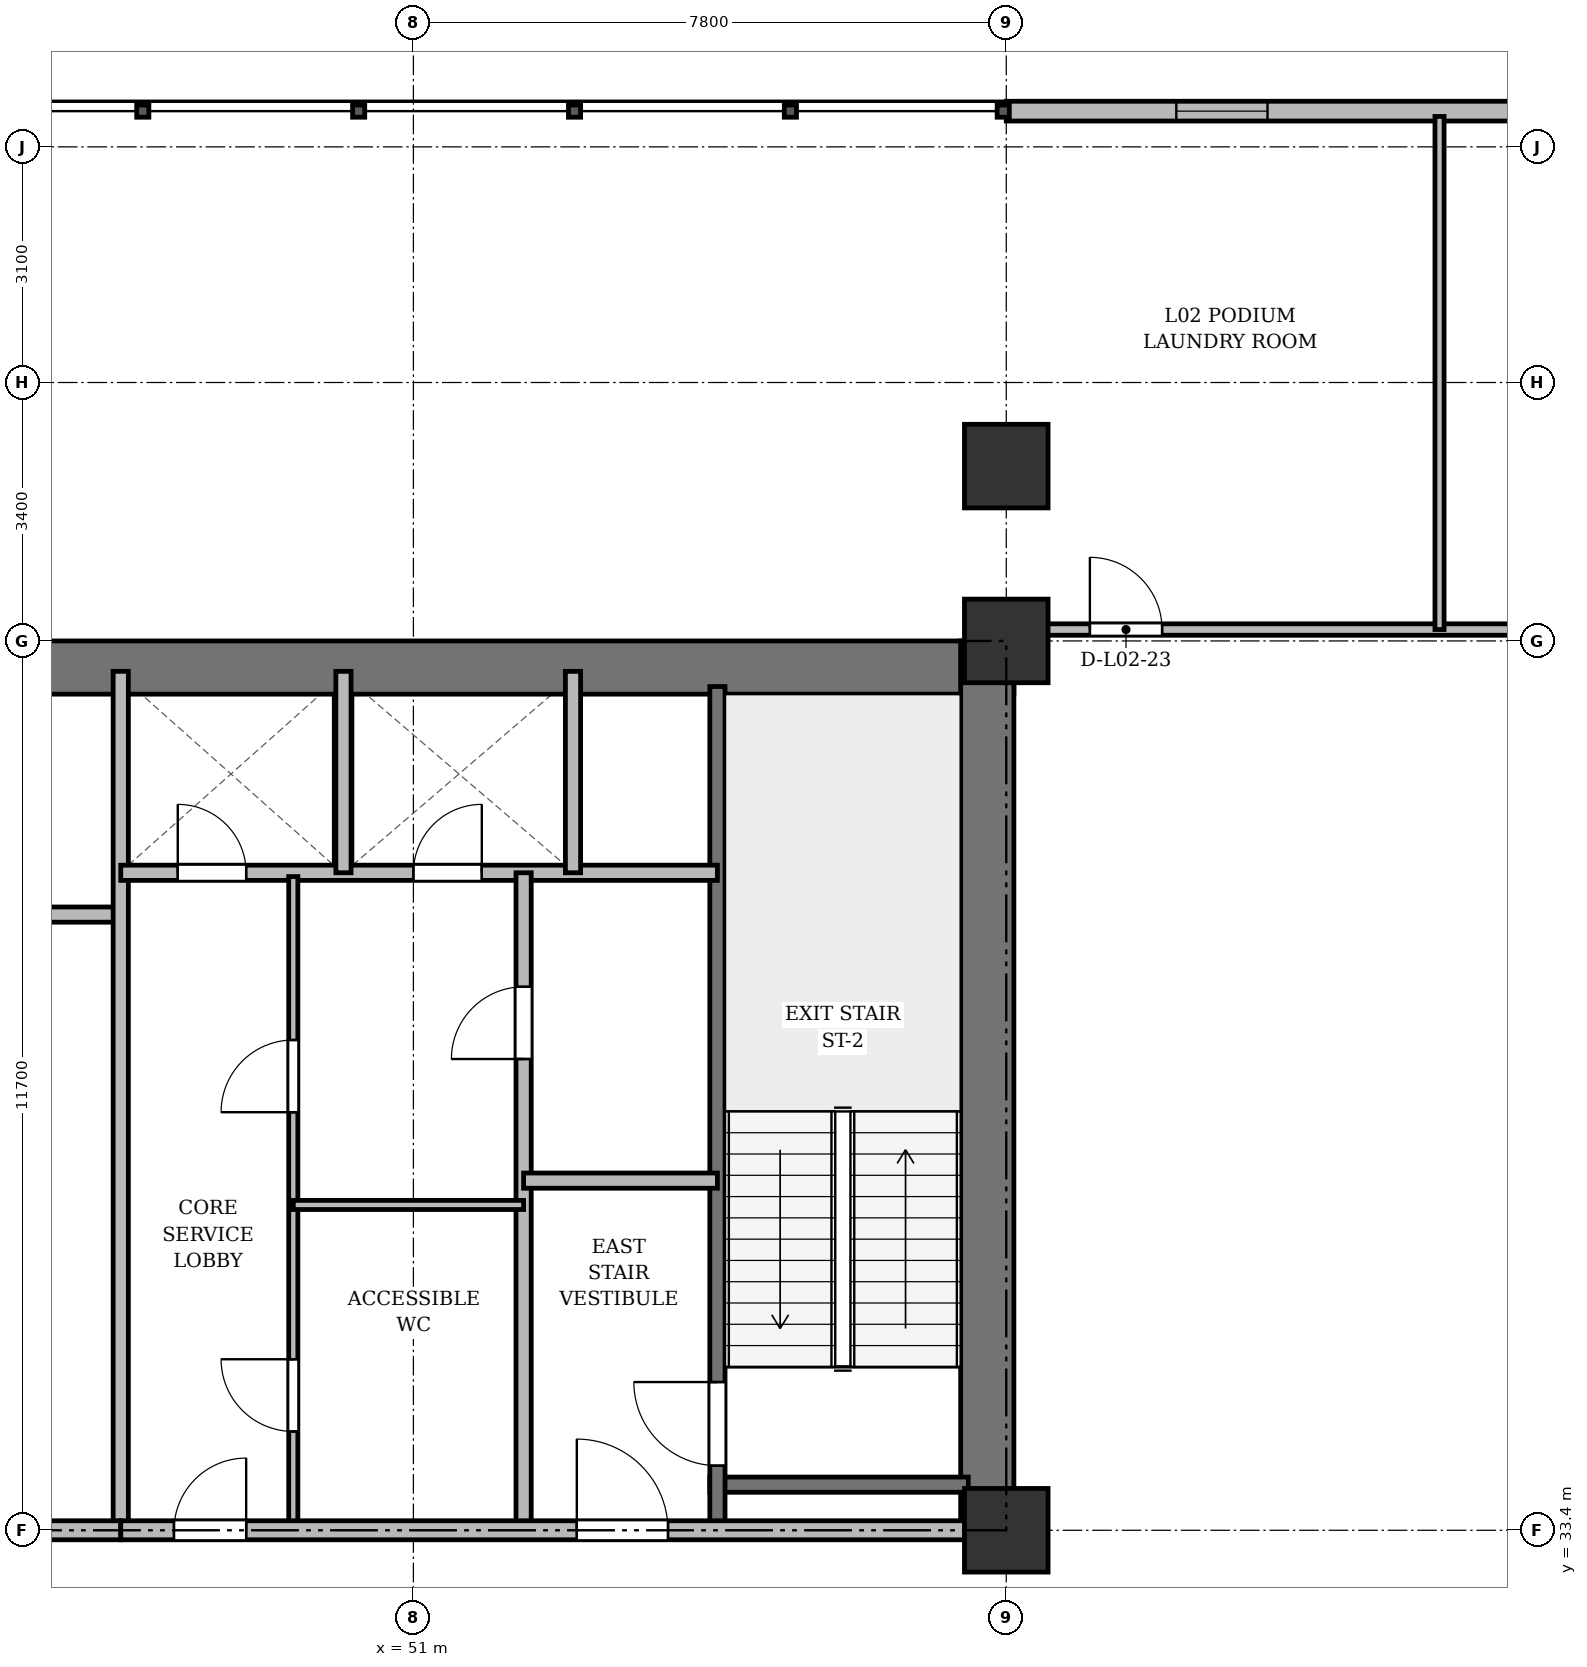
"""IFC4 building model, lengths in metres.
Left out: names, types, materials, properties, quantities, classifications, styles, units other than length and angle.
Written with IfcOpenShell. Run it as: python <this file> out.ifc"""

import sys

from ifc_helpers import new_model, si_unit, direction, frame, frame_2d, origin, origin_2d, place, context, subcontext, project, spatial, rectangle, extrude, source, transform, mapped, element, fill, save


model = new_model("IFC4")
c1 = context("Model", 3, precision=1e-05, world=origin(), true_north=direction((0.0, 1.0)))
c2 = subcontext(c1, "Body", "Model", "MODEL_VIEW")
j1 = project(units=[si_unit("LENGTHUNIT", "METRE"), si_unit("PLANEANGLEUNIT", "RADIAN")], contexts=[c1])
p1 = place(None, origin())
s1 = spatial("IfcSite", under=j1, at=p1, CompositionType="ELEMENT")
p2 = place(p1, origin())
s2 = spatial("IfcBuilding", under=s1, at=p2, CompositionType="ELEMENT")
p3 = place(p2, frame((0.0, 0.0, 9.7)))
s3 = spatial("IfcBuildingStorey", under=s2, at=p3, CompositionType="ELEMENT", Elevation=9.7)
m1 = source(origin(), c2, "Body", "SweptSolid", [
    extrude(rectangle(XDim=1.1, YDim=1.1, at=origin_2d()), origin(), (0.0, 0.0, 1.0), 4.5),
])
for number, where, z_axis, x_axis in (
    (1, (58.8, 33.4, 0.0), (0.0, 0.0, 1.0), (1.0, 0.0, 0.0)),
    (2, (58.8, 45.1, 0.0), (0.0, 0.0, 1.0), (1.0, 0.0, 0.0)),
    (3, (58.8, 47.4, 0.0), (0.0, 0.0, 1.0), (1.0, 0.0, 0.0)),
):
    element("IfcColumn", number, at=place(p3, frame(where, z_axis=z_axis, x_axis=x_axis)), inside=s3, PredefinedType="COLUMN", context=c2, shape_type="MappedRepresentation", body=[
        mapped(m1, transform((0.0, 0.0, 0.0), x_axis=(1.0, 0.0, 0.0), y_axis=(0.0, 1.0, 0.0), z_axis=(0.0, 0.0, 1.0), scale=1.0)),
    ])
p4 = place(p3, frame((58.8, 52.07, 0.0), z_axis=(0.0, 0.0, 1.0), x_axis=(1.0, 0.0, 0.0)))
e4 = element("IfcWall", 4, at=p4, inside=s3, PredefinedType="SOLIDWALL", context=c2, shape_type="SweptSolid", body=[
    extrude(rectangle(XDim=17.45, YDim=0.26, at=frame_2d((8.725, 0.0))), origin(), (0.0, 0.0, 1.0), 4.2),
])
p5 = place(p4, frame((2.237, 0.0, 0.9)))
e5 = element("IfcOpeningElement", 5, at=p5, cuts=e4, PredefinedType="OPENING", context=c2, shape_type="SweptSolid", body=[
    extrude(rectangle(XDim=1.2, YDim=1.65, at=frame_2d((0.6, 0.825))), frame((0.0, 0.14, 0.0), z_axis=(0.0, -1.0, 0.0), x_axis=(1.0, 0.0, 0.0)), (0.0, 0.0, 1.0), 0.28),
])
p6 = place(p4, frame((10.985, 0.0, 0.9)))
e6 = element("IfcOpeningElement", 6, at=p6, cuts=e4, PredefinedType="OPENING", context=c2, shape_type="SweptSolid", body=[
    extrude(rectangle(XDim=1.2, YDim=1.65, at=frame_2d((0.6, 0.825))), frame((0.0, 0.14, 0.0), z_axis=(0.0, -1.0, 0.0), x_axis=(1.0, 0.0, 0.0)), (0.0, 0.0, 1.0), 0.28),
])
p7 = place(p3, frame((15.5, 44.75, 0.0), z_axis=(0.0, 0.0, 1.0), x_axis=(1.0, 0.0, 0.0)))
e7 = element("IfcWall", 7, at=p7, inside=s3, PredefinedType="SHEAR", context=c2, shape_type="SweptSolid", body=[
    extrude(rectangle(XDim=43.4, YDim=0.7, at=frame_2d((21.7, 0.0))), origin(), (0.0, 0.0, 1.0), 4.2),
])
p8 = place(p3, frame((58.55, 33.4, 0.0), z_axis=(0.0, 0.0, 1.0), x_axis=(0.0, 1.0, 0.0)))
e8 = element("IfcWall", 8, at=p8, inside=s3, PredefinedType="SHEAR", context=c2, shape_type="SweptSolid", body=[
    extrude(rectangle(XDim=11.7, YDim=0.7, at=frame_2d((5.85, 0.0))), origin(), (0.0, 0.0, 1.0), 4.2),
])
p9 = place(p3, frame((54.9, 34.0, 0.0), z_axis=(0.0, 0.0, 1.0), x_axis=(1.0, 0.0, 0.0)))
e9 = element("IfcWall", 9, at=p9, inside=s3, PredefinedType="SHEAR", context=c2, shape_type="SweptSolid", body=[
    extrude(rectangle(XDim=3.4, YDim=0.2, at=frame_2d((1.7, 0.0))), origin(), (0.0, 0.0, 1.0), 4.2),
])
p10 = place(p3, frame((55.0, 33.4, 0.0), z_axis=(0.0, 0.0, 1.0), x_axis=(0.0, 1.0, 0.0)))
e10 = element("IfcWall", 10, at=p10, inside=s3, PredefinedType="SHEAR", context=c2, shape_type="SweptSolid", body=[
    extrude(rectangle(XDim=11.1, YDim=0.2, at=frame_2d((5.55, 0.0))), origin(), (0.0, 0.0, 1.0), 4.2),
])
p11 = place(p10, frame((0.85, 0.0, 0.0)))
e11 = element("IfcOpeningElement", 11, at=p11, cuts=e10, PredefinedType="OPENING", context=c2, shape_type="SweptSolid", body=[
    extrude(rectangle(XDim=1.1, YDim=2.15, at=frame_2d((0.55, 1.075))), frame((0.0, 0.11, 0.0), z_axis=(0.0, -1.0, 0.0), x_axis=(1.0, 0.0, 0.0)), (0.0, 0.0, 1.0), 0.22),
])
p12 = place(p3, frame((40.25, 41.5, 0.0), z_axis=(0.0, 0.0, 1.0), x_axis=(1.0, 0.0, 0.0)))
e12 = element("IfcWall", 12, at=p12, inside=s3, PredefinedType="SOLIDWALL", context=c2, shape_type="SweptSolid", body=[
    extrude(rectangle(XDim=6.9, YDim=0.2, at=frame_2d((3.45, 0.0))), origin(), (0.0, 0.0, 1.0), 3.4),
])
p13 = place(p3, frame((47.15, 33.4, 0.0), z_axis=(0.0, 0.0, 1.0), x_axis=(0.0, 1.0, 0.0)))
e13 = element("IfcWall", 13, at=p13, inside=s3, PredefinedType="SOLIDWALL", context=c2, shape_type="SweptSolid", body=[
    extrude(rectangle(XDim=11.3, YDim=0.2, at=frame_2d((5.65, 0.0))), origin(), (0.0, 0.0, 1.0), 3.1),
])
p14 = place(p3, frame((26.3, 33.4, 0.0), z_axis=(0.0, 0.0, 1.0), x_axis=(1.0, 0.0, 0.0)))
e14 = element("IfcWall", 14, at=p14, inside=s3, PredefinedType="PARTITIONING", context=c2, shape_type="SweptSolid", body=[
    extrude(rectangle(XDim=20.85, YDim=0.25, at=frame_2d((10.425, 0.0))), origin(), (0.0, 0.0, 1.0), 3.1),
])
p15 = place(p14, frame((9.2, 0.0, 0.0)))
e15 = element("IfcOpeningElement", 15, at=p15, cuts=e14, PredefinedType="OPENING", context=c2, shape_type="SweptSolid", body=[
    extrude(rectangle(XDim=1.6, YDim=2.2, at=frame_2d((0.8, 1.1))), frame((0.0, 0.135, 0.0), z_axis=(0.0, -1.0, 0.0), x_axis=(1.0, 0.0, 0.0)), (0.0, 0.0, 1.0), 0.27),
])
p16 = place(p3, frame((47.15, 42.05, 0.0), z_axis=(0.0, 0.0, 1.0), x_axis=(1.0, 0.0, 0.0)))
e16 = element("IfcWall", 16, at=p16, inside=s3, PredefinedType="SOLIDWALL", context=c2, shape_type="SweptSolid", body=[
    extrude(rectangle(XDim=7.85, YDim=0.2, at=frame_2d((3.925, 0.0))), origin(), (0.0, 0.0, 1.0), 4.2),
])
p17 = place(p16, frame((0.75, 0.0, 0.0)))
e17 = element("IfcOpeningElement", 17, at=p17, cuts=e16, PredefinedType="OPENING", context=c2, shape_type="SweptSolid", body=[
    extrude(rectangle(XDim=0.9, YDim=2.1, at=frame_2d((0.45, 1.05))), frame((0.0, 0.11, 0.0), z_axis=(0.0, -1.0, 0.0), x_axis=(1.0, 0.0, 0.0)), (0.0, 0.0, 1.0), 0.22),
])
p18 = place(p16, frame((3.85, 0.0, 0.0)))
e18 = element("IfcOpeningElement", 18, at=p18, cuts=e16, PredefinedType="OPENING", context=c2, shape_type="SweptSolid", body=[
    extrude(rectangle(XDim=0.9, YDim=2.1, at=frame_2d((0.45, 1.05))), frame((0.0, 0.11, 0.0), z_axis=(0.0, -1.0, 0.0), x_axis=(1.0, 0.0, 0.0)), (0.0, 0.0, 1.0), 0.22),
])
for number, where, z_axis, x_axis in (
    (19, (50.08, 42.05, 0.0), (0.0, 0.0, 1.0), (0.0, 1.0, 0.0)),
    (20, (53.1, 42.05, 0.0), (0.0, 0.0, 1.0), (0.0, 1.0, 0.0)),
):
    element("IfcWall", number, at=place(p3, frame(where, z_axis=z_axis, x_axis=x_axis)), inside=s3, PredefinedType="SOLIDWALL", context=c2, shape_type="SweptSolid", body=[
        extrude(rectangle(XDim=2.65, YDim=0.2, at=frame_2d((1.325, 0.0))), origin(), (0.0, 0.0, 1.0), 4.2),
    ])
p19 = place(p3, frame((52.45, 33.4, 0.0), z_axis=(0.0, 0.0, 1.0), x_axis=(0.0, 1.0, 0.0)))
e21 = element("IfcWall", 21, at=p19, inside=s3, PredefinedType="PARTITIONING", context=c2, shape_type="SweptSolid", body=[
    extrude(rectangle(XDim=8.65, YDim=0.2, at=frame_2d((4.325, 0.0))), origin(), (0.0, 0.0, 1.0), 3.1),
])
p20 = place(p19, frame((6.2, 0.0, 0.0)))
e22 = element("IfcOpeningElement", 22, at=p20, cuts=e21, PredefinedType="OPENING", context=c2, shape_type="SweptSolid", body=[
    extrude(rectangle(XDim=0.95, YDim=2.15, at=frame_2d((0.475, 1.075))), frame((0.0, 0.11, 0.0), z_axis=(0.0, -1.0, 0.0), x_axis=(1.0, 0.0, 0.0)), (0.0, 0.0, 1.0), 0.22),
])
p21 = place(p3, frame((52.45, 38.0, 0.0), z_axis=(0.0, 0.0, 1.0), x_axis=(1.0, 0.0, 0.0)))
e23 = element("IfcWall", 23, at=p21, inside=s3, PredefinedType="PARTITIONING", context=c2, shape_type="SweptSolid", body=[
    extrude(rectangle(XDim=2.55, YDim=0.2, at=frame_2d((1.275, 0.0))), origin(), (0.0, 0.0, 1.0), 4.2),
])
p22 = place(p3, frame((49.42, 33.4, 0.0), z_axis=(0.0, 0.0, 1.0), x_axis=(0.0, 1.0, 0.0)))
e24 = element("IfcWall", 24, at=p22, inside=s3, PredefinedType="PARTITIONING", context=c2, shape_type="SweptSolid", body=[
    extrude(rectangle(XDim=8.6, YDim=0.12, at=frame_2d((4.3, 0.0))), origin(), (0.0, 0.0, 1.0), 3.1),
])
p23 = place(p22, frame((1.3, 0.0, 0.0)))
e25 = element("IfcOpeningElement", 25, at=p23, cuts=e24, PredefinedType="OPENING", context=c2, shape_type="SweptSolid", body=[
    extrude(rectangle(XDim=0.95, YDim=2.15, at=frame_2d((0.475, 1.075))), frame((0.0, 0.07, 0.0), z_axis=(0.0, -1.0, 0.0), x_axis=(1.0, 0.0, 0.0)), (0.0, 0.0, 1.0), 0.14),
])
p24 = place(p22, frame((5.5, 0.0, 0.0)))
e26 = element("IfcOpeningElement", 26, at=p24, cuts=e24, PredefinedType="OPENING", context=c2, shape_type="SweptSolid", body=[
    extrude(rectangle(XDim=0.95, YDim=2.15, at=frame_2d((0.475, 1.075))), frame((0.0, 0.07, 0.0), z_axis=(0.0, -1.0, 0.0), x_axis=(1.0, 0.0, 0.0)), (0.0, 0.0, 1.0), 0.14),
])
p25 = place(p3, frame((49.42, 37.68, 0.0), z_axis=(0.0, 0.0, 1.0), x_axis=(1.0, 0.0, 0.0)))
e27 = element("IfcWall", 27, at=p25, inside=s3, PredefinedType="PARTITIONING", context=c2, shape_type="SweptSolid", body=[
    extrude(rectangle(XDim=3.03, YDim=0.12, at=frame_2d((1.515, 0.0))), origin(), (0.0, 0.0, 1.0), 4.2),
])
p26 = place(p3, frame((47.15, 33.4, 0.0), z_axis=(0.0, 0.0, 1.0), x_axis=(1.0, 0.0, 0.0)))
e28 = element("IfcWall", 28, at=p26, inside=s3, PredefinedType="PARTITIONING", context=c2, shape_type="SweptSolid", body=[
    extrude(rectangle(XDim=11.15, YDim=0.25, at=frame_2d((5.575, 0.0))), origin(), (0.0, 0.0, 1.0), 3.1),
])
p27 = place(p26, frame((0.7, 0.0, 0.0)))
e29 = element("IfcOpeningElement", 29, at=p27, cuts=e28, PredefinedType="OPENING", context=c2, shape_type="SweptSolid", body=[
    extrude(rectangle(XDim=0.95, YDim=2.15, at=frame_2d((0.475, 1.075))), frame((0.0, 0.135, 0.0), z_axis=(0.0, -1.0, 0.0), x_axis=(1.0, 0.0, 0.0)), (0.0, 0.0, 1.0), 0.27),
])
p28 = place(p26, frame((6.0, 0.0, 0.0)))
e30 = element("IfcOpeningElement", 30, at=p28, cuts=e28, PredefinedType="OPENING", context=c2, shape_type="SweptSolid", body=[
    extrude(rectangle(XDim=1.2, YDim=2.15, at=frame_2d((0.6, 1.075))), frame((0.0, 0.135, 0.0), z_axis=(0.0, -1.0, 0.0), x_axis=(1.0, 0.0, 0.0)), (0.0, 0.0, 1.0), 0.27),
])
p29 = place(p3, frame((58.6, 45.25, 0.0), z_axis=(0.0, 0.0, 1.0), x_axis=(1.0, 0.0, 0.0)))
e31 = element("IfcWall", 31, at=p29, inside=s3, PredefinedType="PARTITIONING", context=c2, shape_type="SweptSolid", body=[
    extrude(rectangle(XDim=17.55, YDim=0.15, at=frame_2d((8.775, 0.0))), origin(), (0.0, 0.0, 1.0), 3.1),
])
p30 = place(p29, frame((1.3, 0.0, 0.0)))
e32 = element("IfcOpeningElement", 32, at=p30, cuts=e31, PredefinedType="OPENING", context=c2, shape_type="SweptSolid", body=[
    extrude(rectangle(XDim=0.95, YDim=2.15, at=frame_2d((0.475, 1.075))), frame((0.0, 0.085, 0.0), z_axis=(0.0, -1.0, 0.0), x_axis=(1.0, 0.0, 0.0)), (0.0, 0.0, 1.0), 0.17),
])
p31 = place(p29, frame((7.0, 0.0, 0.0)))
e33 = element("IfcOpeningElement", 33, at=p31, cuts=e31, PredefinedType="OPENING", context=c2, shape_type="SweptSolid", body=[
    extrude(rectangle(XDim=0.95, YDim=2.15, at=frame_2d((0.475, 1.075))), frame((0.0, 0.085, 0.0), z_axis=(0.0, -1.0, 0.0), x_axis=(1.0, 0.0, 0.0)), (0.0, 0.0, 1.0), 0.17),
])
p32 = place(p3, frame((64.5, 45.25, 0.0), z_axis=(0.0, 0.0, 1.0), x_axis=(0.0, 1.0, 0.0)))
e34 = element("IfcWall", 34, at=p32, inside=s3, PredefinedType="PARTITIONING", context=c2, shape_type="SweptSolid", body=[
    extrude(rectangle(XDim=6.75, YDim=0.12, at=frame_2d((3.375, 0.0))), origin(), (0.0, 0.0, 1.0), 3.1),
])
m2 = source(origin(), c2, "Body", "SweptSolid", [
    extrude(rectangle(XDim=1.2, YDim=1.65, at=frame_2d((0.6, 0.825))), frame((0.0, 0.03, 0.0), z_axis=(0.0, -1.0, 0.0), x_axis=(1.0, 0.0, 0.0)), (0.0, 0.0, 1.0), 0.06),
])
p33 = place(p5, origin())
e35 = element("IfcWindow", 35, at=p33, inside=s3, PartitioningType="SINGLE_PANEL", PredefinedType="WINDOW", context=c2, shape_type="MappedRepresentation", body=[
    mapped(m2, transform((0.0, 0.0, 0.0), x_axis=(1.0, 0.0, 0.0), y_axis=(0.0, 1.0, 0.0), z_axis=(0.0, 0.0, 1.0), scale=1.0)),
])
fill(e5, e35)
m3 = source(origin(), c2, "Body", "SweptSolid", [
    extrude(rectangle(XDim=1.1, YDim=2.15, at=frame_2d((0.55, 1.075))), frame((0.0, 0.025, 0.0), z_axis=(0.0, -1.0, 0.0), x_axis=(1.0, 0.0, 0.0)), (0.0, 0.0, 1.0), 0.05),
])
p34 = place(p11, origin())
e36 = element("IfcDoor", 36, at=p34, inside=s3, OperationType="SINGLE_SWING_RIGHT", PredefinedType="DOOR", context=c2, shape_type="MappedRepresentation", body=[
    mapped(m3, transform((0.0, 0.0, 0.0), x_axis=(1.0, 0.0, 0.0), y_axis=(0.0, 1.0, 0.0), z_axis=(0.0, 0.0, 1.0), scale=1.0)),
])
fill(e11, e36)
m4 = source(origin(), c2, "Body", "SweptSolid", [
    extrude(rectangle(XDim=0.9, YDim=2.1, at=frame_2d((0.45, 1.05))), frame((0.0, 0.025, 0.0), z_axis=(0.0, -1.0, 0.0), x_axis=(1.0, 0.0, 0.0)), (0.0, 0.0, 1.0), 0.05),
])
p35 = place(p17, origin())
e37 = element("IfcDoor", 37, at=p35, inside=s3, OperationType="SINGLE_SWING_LEFT", PredefinedType="DOOR", context=c2, shape_type="MappedRepresentation", body=[
    mapped(m4, transform((0.0, 0.0, 0.0), x_axis=(1.0, 0.0, 0.0), y_axis=(0.0, 1.0, 0.0), z_axis=(0.0, 0.0, 1.0), scale=1.0)),
])
fill(e17, e37)
p36 = place(p18, origin())
e38 = element("IfcDoor", 38, at=p36, inside=s3, OperationType="SINGLE_SWING_RIGHT", PredefinedType="DOOR", context=c2, shape_type="MappedRepresentation", body=[
    mapped(m4, transform((0.0, 0.0, 0.0), x_axis=(1.0, 0.0, 0.0), y_axis=(0.0, 1.0, 0.0), z_axis=(0.0, 0.0, 1.0), scale=1.0)),
])
fill(e18, e38)
m5 = source(origin(), c2, "Body", "SweptSolid", [
    extrude(rectangle(XDim=0.95, YDim=2.15, at=frame_2d((0.475, 1.075))), frame((0.0, 0.025, 0.0), z_axis=(0.0, -1.0, 0.0), x_axis=(1.0, 0.0, 0.0)), (0.0, 0.0, 1.0), 0.05),
])
p37 = place(p20, origin())
e39 = element("IfcDoor", 39, at=p37, inside=s3, OperationType="SINGLE_SWING_LEFT", PredefinedType="DOOR", context=c2, shape_type="MappedRepresentation", body=[
    mapped(m5, transform((0.0, 0.0, 0.0), x_axis=(1.0, 0.0, 0.0), y_axis=(0.0, 1.0, 0.0), z_axis=(0.0, 0.0, 1.0), scale=1.0)),
])
fill(e22, e39)
p38 = place(p23, origin())
e40 = element("IfcDoor", 40, at=p38, inside=s3, OperationType="SINGLE_SWING_RIGHT", PredefinedType="DOOR", context=c2, shape_type="MappedRepresentation", body=[
    mapped(m5, transform((0.0, 0.0, 0.0), x_axis=(1.0, 0.0, 0.0), y_axis=(0.0, 1.0, 0.0), z_axis=(0.0, 0.0, 1.0), scale=1.0)),
])
fill(e25, e40)
p39 = place(p24, origin())
e41 = element("IfcDoor", 41, at=p39, inside=s3, OperationType="SINGLE_SWING_LEFT", PredefinedType="DOOR", context=c2, shape_type="MappedRepresentation", body=[
    mapped(m5, transform((0.0, 0.0, 0.0), x_axis=(1.0, 0.0, 0.0), y_axis=(0.0, 1.0, 0.0), z_axis=(0.0, 0.0, 1.0), scale=1.0)),
])
fill(e26, e41)
p40 = place(p27, origin())
e42 = element("IfcDoor", 42, at=p40, inside=s3, OperationType="SINGLE_SWING_RIGHT", PredefinedType="DOOR", context=c2, shape_type="MappedRepresentation", body=[
    mapped(m5, transform((0.0, 0.0, 0.0), x_axis=(1.0, 0.0, 0.0), y_axis=(0.0, 1.0, 0.0), z_axis=(0.0, 0.0, 1.0), scale=1.0)),
])
fill(e29, e42)
m6 = source(origin(), c2, "Body", "SweptSolid", [
    extrude(rectangle(XDim=1.2, YDim=2.15, at=frame_2d((0.6, 1.075))), frame((0.0, 0.025, 0.0), z_axis=(0.0, -1.0, 0.0), x_axis=(1.0, 0.0, 0.0)), (0.0, 0.0, 1.0), 0.05),
])
p41 = place(p28, origin())
e43 = element("IfcDoor", 43, at=p41, inside=s3, OperationType="SINGLE_SWING_LEFT", PredefinedType="DOOR", context=c2, shape_type="MappedRepresentation", body=[
    mapped(m6, transform((0.0, 0.0, 0.0), x_axis=(1.0, 0.0, 0.0), y_axis=(0.0, 1.0, 0.0), z_axis=(0.0, 0.0, 1.0), scale=1.0)),
])
fill(e30, e43)
p42 = place(p30, origin())
e44 = element("IfcDoor", 44, at=p42, inside=s3, OperationType="SINGLE_SWING_LEFT", PredefinedType="DOOR", context=c2, shape_type="MappedRepresentation", body=[
    mapped(m5, transform((0.0, 0.0, 0.0), x_axis=(1.0, 0.0, 0.0), y_axis=(0.0, 1.0, 0.0), z_axis=(0.0, 0.0, 1.0), scale=1.0)),
])
fill(e32, e44)
save(model, sys.argv[1])
